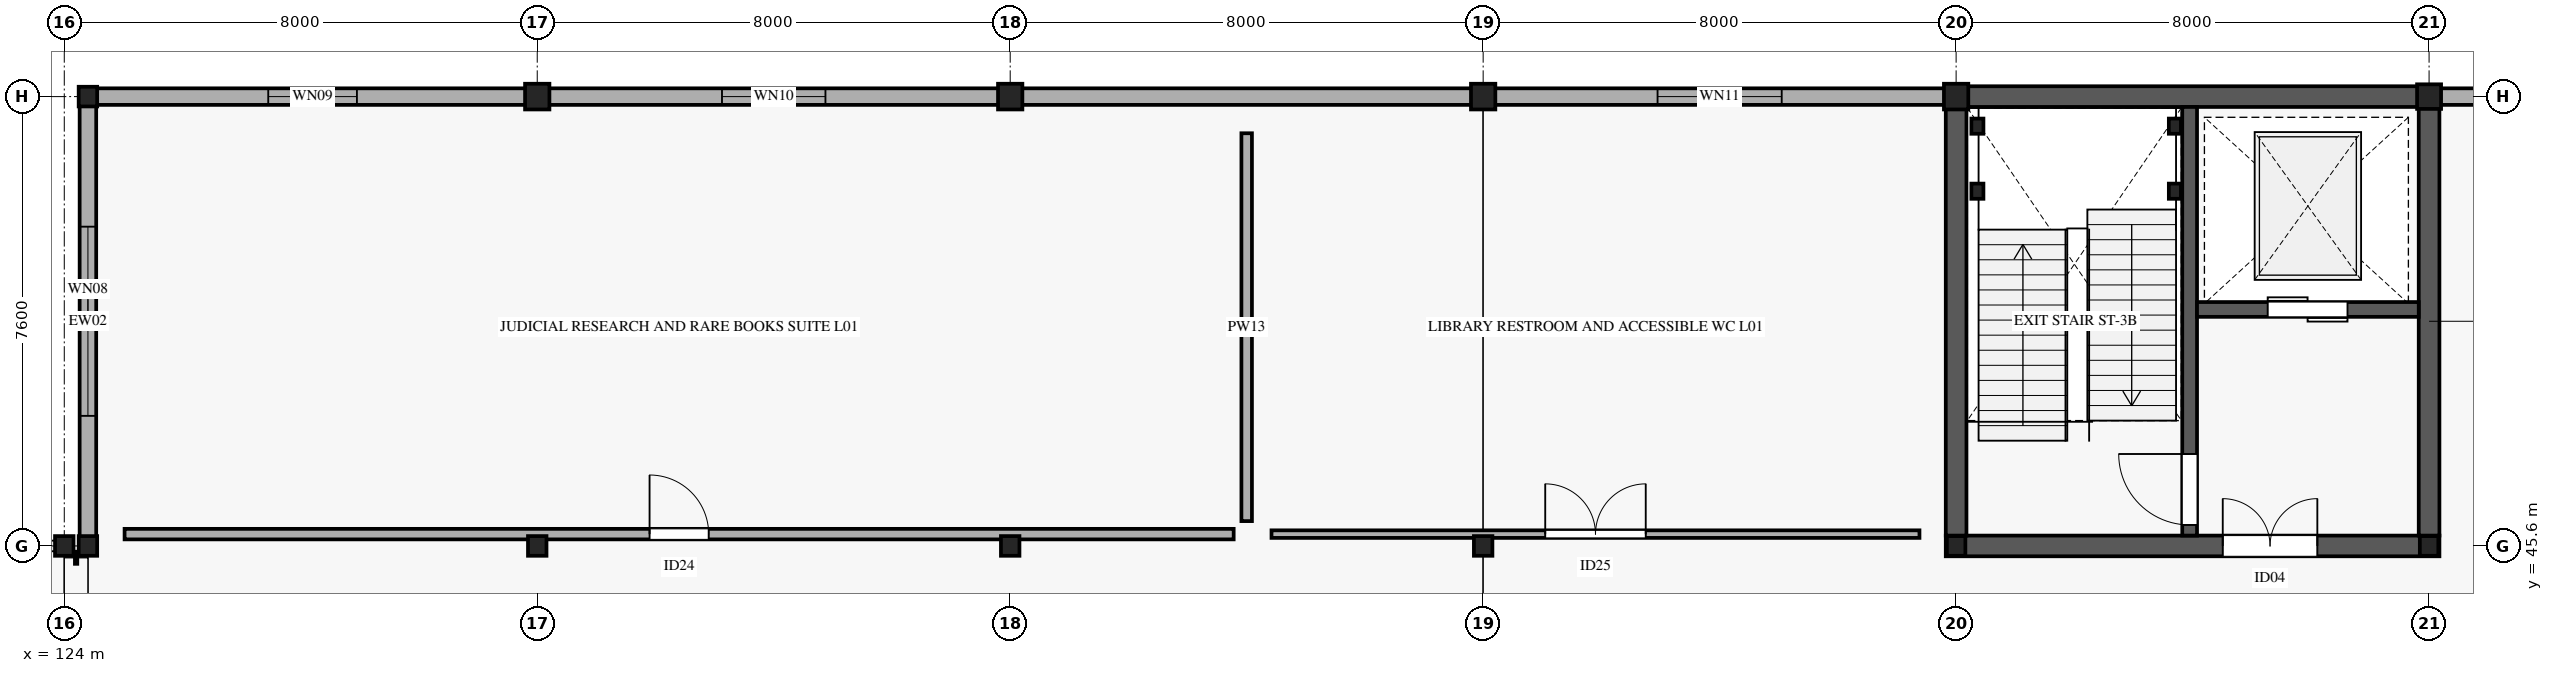
"""IFC4 building model, lengths in metres.
Left out: names, types, materials, properties, quantities, classifications, styles, units other than length and angle.
Written with IfcOpenShell. Run it as: python <this file> out.ifc"""

import sys

from ifc_helpers import new_model, si_unit, direction, frame, frame_2d, origin, origin_2d, place, context, subcontext, project, spatial, rectangle, i_section, extrude, element, fill, save


model = new_model("IFC4")
c1 = context("Model", 3, precision=1e-05, world=origin(), true_north=direction((0.0, 1.0)))
c2 = subcontext(c1, "Body", "Model", "MODEL_VIEW")
j1 = project(units=[si_unit("LENGTHUNIT", "METRE"), si_unit("PLANEANGLEUNIT", "RADIAN")], contexts=[c1])
p1 = place(None, origin())
s1 = spatial("IfcSite", under=j1, at=p1, CompositionType="ELEMENT")
p2 = place(p1, origin())
s2 = spatial("IfcBuilding", under=s1, at=p2, CompositionType="ELEMENT")
p3 = place(p2, frame((0.0, 0.0, 5.4)))
s3 = spatial("IfcBuildingStorey", under=s2, at=p3, CompositionType="ELEMENT", Elevation=5.4)
for number, where, z_axis, x_axis in (
    (1, (124.4, 45.6, 0.0), (0.0, 0.0, 1.0), (1.0, 0.0, 0.0)),
    (2, (124.4, 53.2, 0.0), (0.0, 0.0, 1.0), (1.0, 0.0, 0.0)),
    (3, (132.0, 45.6, 0.0), (0.0, 0.0, 1.0), (1.0, 0.0, 0.0)),
):
    element("IfcColumn", number, at=place(p3, frame(where, z_axis=z_axis, x_axis=x_axis)), inside=s3, PredefinedType="COLUMN", context=c2, shape_type="SweptSolid", body=[
        extrude(i_section(OverallWidth=0.313, OverallDepth=0.333, WebThickness=0.018, FlangeThickness=0.028, FilletRadius=0.015, at=origin_2d()), origin(), (0.0, 0.0, 1.0), 5.185),
    ])
p4 = place(p3, frame((132.0, 53.2, 0.0), z_axis=(0.0, 0.0, 1.0), x_axis=(1.0, 0.0, 0.0)))
e4 = element("IfcColumn", 4, at=p4, inside=s3, PredefinedType="COLUMN", context=c2, shape_type="SweptSolid", body=[
    extrude(i_section(OverallWidth=0.412, OverallDepth=0.435, WebThickness=0.036, FlangeThickness=0.057, FilletRadius=0.015, at=origin_2d()), origin(), (0.0, 0.0, 1.0), 5.185),
])
p5 = place(p3, frame((140.0, 45.6, 0.0), z_axis=(0.0, 0.0, 1.0), x_axis=(1.0, 0.0, 0.0)))
e5 = element("IfcColumn", 5, at=p5, inside=s3, PredefinedType="COLUMN", context=c2, shape_type="SweptSolid", body=[
    extrude(i_section(OverallWidth=0.313, OverallDepth=0.333, WebThickness=0.018, FlangeThickness=0.028, FilletRadius=0.015, at=origin_2d()), origin(), (0.0, 0.0, 1.0), 5.185),
])
p6 = place(p3, frame((140.0, 53.2, 0.0), z_axis=(0.0, 0.0, 1.0), x_axis=(1.0, 0.0, 0.0)))
e6 = element("IfcColumn", 6, at=p6, inside=s3, PredefinedType="COLUMN", context=c2, shape_type="SweptSolid", body=[
    extrude(i_section(OverallWidth=0.412, OverallDepth=0.435, WebThickness=0.036, FlangeThickness=0.057, FilletRadius=0.015, at=origin_2d()), origin(), (0.0, 0.0, 1.0), 5.185),
])
p7 = place(p3, frame((148.0, 45.6, 0.0), z_axis=(0.0, 0.0, 1.0), x_axis=(1.0, 0.0, 0.0)))
e7 = element("IfcColumn", 7, at=p7, inside=s3, PredefinedType="COLUMN", context=c2, shape_type="SweptSolid", body=[
    extrude(i_section(OverallWidth=0.313, OverallDepth=0.333, WebThickness=0.018, FlangeThickness=0.028, FilletRadius=0.015, at=origin_2d()), origin(), (0.0, 0.0, 1.0), 5.185),
])
p8 = place(p3, frame((148.0, 53.2, 0.0), z_axis=(0.0, 0.0, 1.0), x_axis=(1.0, 0.0, 0.0)))
e8 = element("IfcColumn", 8, at=p8, inside=s3, PredefinedType="COLUMN", context=c2, shape_type="SweptSolid", body=[
    extrude(i_section(OverallWidth=0.412, OverallDepth=0.435, WebThickness=0.036, FlangeThickness=0.057, FilletRadius=0.015, at=origin_2d()), origin(), (0.0, 0.0, 1.0), 5.185),
])
p9 = place(p3, frame((156.0, 45.6, 0.0), z_axis=(0.0, 0.0, 1.0), x_axis=(1.0, 0.0, 0.0)))
e9 = element("IfcColumn", 9, at=p9, inside=s3, PredefinedType="COLUMN", context=c2, shape_type="SweptSolid", body=[
    extrude(i_section(OverallWidth=0.313, OverallDepth=0.333, WebThickness=0.018, FlangeThickness=0.028, FilletRadius=0.015, at=origin_2d()), origin(), (0.0, 0.0, 1.0), 5.185),
])
p10 = place(p3, frame((156.0, 53.2, 0.0), z_axis=(0.0, 0.0, 1.0), x_axis=(1.0, 0.0, 0.0)))
e10 = element("IfcColumn", 10, at=p10, inside=s3, PredefinedType="COLUMN", context=c2, shape_type="SweptSolid", body=[
    extrude(i_section(OverallWidth=0.412, OverallDepth=0.435, WebThickness=0.036, FlangeThickness=0.057, FilletRadius=0.015, at=origin_2d()), origin(), (0.0, 0.0, 1.0), 5.185),
])
p11 = place(p3, frame((164.0, 45.6, 0.0), z_axis=(0.0, 0.0, 1.0), x_axis=(1.0, 0.0, 0.0)))
e11 = element("IfcColumn", 11, at=p11, inside=s3, PredefinedType="COLUMN", context=c2, shape_type="SweptSolid", body=[
    extrude(i_section(OverallWidth=0.313, OverallDepth=0.333, WebThickness=0.018, FlangeThickness=0.028, FilletRadius=0.015, at=origin_2d()), origin(), (0.0, 0.0, 1.0), 5.185),
])
p12 = place(p3, frame((164.0, 53.2, 0.0), z_axis=(0.0, 0.0, 1.0), x_axis=(1.0, 0.0, 0.0)))
e12 = element("IfcColumn", 12, at=p12, inside=s3, PredefinedType="COLUMN", context=c2, shape_type="SweptSolid", body=[
    extrude(i_section(OverallWidth=0.406, OverallDepth=0.416, WebThickness=0.03, FlangeThickness=0.048, FilletRadius=0.015, at=origin_2d()), origin(), (0.0, 0.0, 1.0), 5.185),
])
p13 = place(p3, frame((124.0, 45.6, 0.0), z_axis=(0.0, 0.0, 1.0), x_axis=(1.0, 0.0, 0.0)))
e13 = element("IfcColumn", 13, at=p13, inside=s3, PredefinedType="COLUMN", context=c2, shape_type="SweptSolid", body=[
    extrude(i_section(OverallWidth=0.313, OverallDepth=0.333, WebThickness=0.018, FlangeThickness=0.028, FilletRadius=0.015, at=origin_2d()), origin(), (0.0, 0.0, 1.0), 5.185),
])
p14 = place(p3, frame((124.4, 45.58, 0.0), z_axis=(0.0, 0.0, 1.0), x_axis=(0.0, 1.0, 0.0)))
e14 = element("IfcWall", 14, at=p14, inside=s3, PredefinedType="STANDARD", context=c2, shape_type="SweptSolid", body=[
    extrude(rectangle(XDim=7.64, YDim=0.28, at=frame_2d((3.82, 0.0))), origin(), (0.0, 0.0, 1.0), 4.25),
])
p15 = place(p14, frame((2.22, 0.0, 0.75)))
e15 = element("IfcOpeningElement", 15, at=p15, cuts=e14, PredefinedType="OPENING", context=c2, shape_type="SweptSolid", body=[
    extrude(rectangle(XDim=3.2, YDim=2.0, at=frame_2d((1.6, 1.0))), frame((0.0, 0.15, 0.0), z_axis=(0.0, -1.0, 0.0), x_axis=(1.0, 0.0, 0.0)), (0.0, 0.0, 1.0), 0.3),
])
p16 = place(p3, frame((124.38, 53.2, 0.0), z_axis=(0.0, 0.0, 1.0), x_axis=(1.0, 0.0, 0.0)))
e16 = element("IfcWall", 16, at=p16, inside=s3, PredefinedType="STANDARD", context=c2, shape_type="SweptSolid", body=[
    extrude(rectangle(XDim=7.64, YDim=0.28, at=frame_2d((3.82, 0.0))), origin(), (0.0, 0.0, 1.0), 4.25),
])
p17 = place(p16, frame((3.07, 0.0, 0.75)))
e17 = element("IfcOpeningElement", 17, at=p17, cuts=e16, PredefinedType="OPENING", context=c2, shape_type="SweptSolid", body=[
    extrude(rectangle(XDim=1.5, YDim=2.15, at=frame_2d((0.75, 1.075))), frame((0.0, 0.15, 0.0), z_axis=(0.0, -1.0, 0.0), x_axis=(1.0, 0.0, 0.0)), (0.0, 0.0, 1.0), 0.3),
])
p18 = place(p3, frame((131.98, 53.2, 0.0), z_axis=(0.0, 0.0, 1.0), x_axis=(1.0, 0.0, 0.0)))
e18 = element("IfcWall", 18, at=p18, inside=s3, PredefinedType="STANDARD", context=c2, shape_type="SweptSolid", body=[
    extrude(rectangle(XDim=8.04, YDim=0.28, at=frame_2d((4.02, 0.0))), origin(), (0.0, 0.0, 1.0), 4.25),
])
p19 = place(p18, frame((3.145, 0.0, 0.75)))
e19 = element("IfcOpeningElement", 19, at=p19, cuts=e18, PredefinedType="OPENING", context=c2, shape_type="SweptSolid", body=[
    extrude(rectangle(XDim=1.75, YDim=2.15, at=frame_2d((0.875, 1.075))), frame((0.0, 0.15, 0.0), z_axis=(0.0, -1.0, 0.0), x_axis=(1.0, 0.0, 0.0)), (0.0, 0.0, 1.0), 0.3),
])
p20 = place(p3, frame((139.98, 53.2, 0.0), z_axis=(0.0, 0.0, 1.0), x_axis=(1.0, 0.0, 0.0)))
e20 = element("IfcWall", 20, at=p20, inside=s3, PredefinedType="STANDARD", context=c2, shape_type="SweptSolid", body=[
    extrude(rectangle(XDim=8.04, YDim=0.28, at=frame_2d((4.02, 0.0))), origin(), (0.0, 0.0, 1.0), 4.25),
])
p21 = place(p3, frame((147.98, 53.2, 0.0), z_axis=(0.0, 0.0, 1.0), x_axis=(1.0, 0.0, 0.0)))
e21 = element("IfcWall", 21, at=p21, inside=s3, PredefinedType="STANDARD", context=c2, shape_type="SweptSolid", body=[
    extrude(rectangle(XDim=8.04, YDim=0.28, at=frame_2d((4.02, 0.0))), origin(), (0.0, 0.0, 1.0), 4.25),
])
p22 = place(p21, frame((2.97, 0.0, 0.75)))
e22 = element("IfcOpeningElement", 22, at=p22, cuts=e21, PredefinedType="OPENING", context=c2, shape_type="SweptSolid", body=[
    extrude(rectangle(XDim=2.1, YDim=2.15, at=frame_2d((1.05, 1.075))), frame((0.0, 0.15, 0.0), z_axis=(0.0, -1.0, 0.0), x_axis=(1.0, 0.0, 0.0)), (0.0, 0.0, 1.0), 0.3),
])
p23 = place(p3, frame((163.98, 53.2, 0.0), z_axis=(0.0, 0.0, 1.0), x_axis=(1.0, 0.0, 0.0)))
e23 = element("IfcWall", 23, at=p23, inside=s3, PredefinedType="STANDARD", context=c2, shape_type="SweptSolid", body=[
    extrude(rectangle(XDim=8.04, YDim=0.28, at=frame_2d((4.02, 0.0))), origin(), (0.0, 0.0, 1.0), 4.25),
])
p24 = place(p23, frame((2.77, 0.0, 0.75)))
e24 = element("IfcOpeningElement", 24, at=p24, cuts=e23, PredefinedType="OPENING", context=c2, shape_type="SweptSolid", body=[
    extrude(rectangle(XDim=2.5, YDim=2.15, at=frame_2d((1.25, 1.075))), frame((0.0, 0.15, 0.0), z_axis=(0.0, -1.0, 0.0), x_axis=(1.0, 0.0, 0.0)), (0.0, 0.0, 1.0), 0.3),
])
p25 = place(p3, frame((124.18, 45.4, 0.0), z_axis=(0.0, 0.0, 1.0), x_axis=(1.0, 0.0, 0.0)))
e25 = element("IfcWall", 25, at=p25, inside=s3, PredefinedType="STANDARD", context=c2, shape_type="SweptSolid", body=[
    extrude(rectangle(XDim=0.04, YDim=0.205, at=frame_2d((0.02, 0.0))), origin(), (0.0, 0.0, 1.0), 4.62),
])
p26 = place(p3, frame((155.825, 45.6, 0.0), z_axis=(0.0, 0.0, 1.0), x_axis=(1.0, 0.0, 0.0)))
e26 = element("IfcWall", 26, at=p26, inside=s3, PredefinedType="SHEAR", context=c2, shape_type="SweptSolid", body=[
    extrude(rectangle(XDim=8.35, YDim=0.35, at=frame_2d((4.175, 0.0))), origin(), (0.0, 0.0, 1.0), 5.19),
])
p27 = place(p26, frame((4.685, 0.0, 0.0)))
e27 = element("IfcOpeningElement", 27, at=p27, cuts=e26, PredefinedType="OPENING", context=c2, shape_type="SweptSolid", body=[
    extrude(rectangle(XDim=1.6, YDim=2.35, at=frame_2d((0.8, 1.175))), frame((0.0, 0.185, 0.0), z_axis=(0.0, -1.0, 0.0), x_axis=(1.0, 0.0, 0.0)), (0.0, 0.0, 1.0), 0.37),
])
p28 = place(p3, frame((155.825, 53.2, 0.0), z_axis=(0.0, 0.0, 1.0), x_axis=(1.0, 0.0, 0.0)))
e28 = element("IfcWall", 28, at=p28, inside=s3, PredefinedType="SHEAR", context=c2, shape_type="SweptSolid", body=[
    extrude(rectangle(XDim=8.35, YDim=0.35, at=frame_2d((4.175, 0.0))), origin(), (0.0, 0.0, 1.0), 5.19),
])
for number, where, z_axis, x_axis in (
    (29, (156.0, 45.775, 0.0), (0.0, 0.0, 1.0), (0.0, 1.0, 0.0)),
    (30, (164.0, 45.775, 0.0), (0.0, 0.0, 1.0), (0.0, 1.0, 0.0)),
):
    element("IfcWall", number, at=place(p3, frame(where, z_axis=z_axis, x_axis=x_axis)), inside=s3, PredefinedType="SHEAR", context=c2, shape_type="SweptSolid", body=[
        extrude(rectangle(XDim=7.25, YDim=0.35, at=frame_2d((3.625, 0.0))), origin(), (0.0, 0.0, 1.0), 5.19),
    ])
p29 = place(p3, frame((159.95, 45.775, 0.0), z_axis=(0.0, 0.0, 1.0), x_axis=(0.0, 1.0, 0.0)))
e31 = element("IfcWall", 31, at=p29, inside=s3, PredefinedType="SHEAR", context=c2, shape_type="SweptSolid", body=[
    extrude(rectangle(XDim=7.25, YDim=0.25, at=frame_2d((3.625, 0.0))), origin(), (0.0, 0.0, 1.0), 5.19),
])
p30 = place(p29, frame((0.18, 0.0, 0.0)))
e32 = element("IfcOpeningElement", 32, at=p30, cuts=e31, PredefinedType="OPENING", context=c2, shape_type="SweptSolid", body=[
    extrude(rectangle(XDim=1.2, YDim=2.2, at=frame_2d((0.6, 1.1))), frame((0.0, 0.135, 0.0), z_axis=(0.0, -1.0, 0.0), x_axis=(1.0, 0.0, 0.0)), (0.0, 0.0, 1.0), 0.27),
])
p31 = place(p3, frame((160.075, 49.6, 0.0), z_axis=(0.0, 0.0, 1.0), x_axis=(1.0, 0.0, 0.0)))
e33 = element("IfcWall", 33, at=p31, inside=s3, PredefinedType="SHEAR", context=c2, shape_type="SweptSolid", body=[
    extrude(rectangle(XDim=3.75, YDim=0.25, at=frame_2d((1.875, 0.0))), origin(), (0.0, 0.0, 1.0), 5.19),
])
p32 = place(p31, frame((1.195, 0.0, 0.0)))
e34 = element("IfcOpeningElement", 34, at=p32, cuts=e33, PredefinedType="OPENING", context=c2, shape_type="SweptSolid", body=[
    extrude(rectangle(XDim=1.35, YDim=2.2, at=frame_2d((0.675, 1.1))), frame((0.0, 0.135, 0.0), z_axis=(0.0, -1.0, 0.0), x_axis=(1.0, 0.0, 0.0)), (0.0, 0.0, 1.0), 0.27),
])
for number, where, z_axis, x_axis in (
    (35, (156.36, 51.6, 0.0), (0.0, 0.0, 1.0), (1.0, 0.0, 0.0)),
    (36, (159.7, 51.6, 0.0), (0.0, 0.0, 1.0), (1.0, 0.0, 0.0)),
    (37, (156.36, 52.7, 0.0), (0.0, 0.0, 1.0), (1.0, 0.0, 0.0)),
    (38, (159.7, 52.7, 0.0), (0.0, 0.0, 1.0), (1.0, 0.0, 0.0)),
):
    element("IfcColumn", number, at=place(p3, frame(where, z_axis=z_axis, x_axis=x_axis)), inside=s3, PredefinedType="COLUMN", context=c2, shape_type="SweptSolid", body=[
        extrude(i_section(OverallWidth=0.204, OverallDepth=0.257, WebThickness=0.009, FlangeThickness=0.016, FilletRadius=0.013, at=origin_2d()), origin(), (0.0, 0.0, 1.0), 5.395),
    ])
p33 = place(p3, frame((125.02, 45.8, 0.0), z_axis=(0.0, 0.0, 1.0), x_axis=(1.0, 0.0, 0.0)))
e39 = element("IfcWall", 39, at=p33, inside=s3, PredefinedType="PARTITIONING", context=c2, shape_type="SweptSolid", body=[
    extrude(rectangle(XDim=18.76, YDim=0.178, at=frame_2d((9.38, 0.0))), origin(), (0.0, 0.0, 1.0), 4.05),
])
p34 = place(p33, frame((8.88, 0.0, 0.0)))
e40 = element("IfcOpeningElement", 40, at=p34, cuts=e39, PredefinedType="OPENING", context=c2, shape_type="SweptSolid", body=[
    extrude(rectangle(XDim=1.0, YDim=2.15, at=frame_2d((0.5, 1.075))), frame((0.0, 0.099, 0.0), z_axis=(0.0, -1.0, 0.0), x_axis=(1.0, 0.0, 0.0)), (0.0, 0.0, 1.0), 0.198),
])
p35 = place(p3, frame((144.0, 46.02, 0.0), z_axis=(0.0, 0.0, 1.0), x_axis=(0.0, 1.0, 0.0)))
e41 = element("IfcWall", 41, at=p35, inside=s3, PredefinedType="PARTITIONING", context=c2, shape_type="SweptSolid", body=[
    extrude(rectangle(XDim=6.56, YDim=0.178, at=frame_2d((3.28, 0.0))), origin(), (0.0, 0.0, 1.0), 4.05),
])
p36 = place(p3, frame((144.42, 45.8, 0.0), z_axis=(0.0, 0.0, 1.0), x_axis=(1.0, 0.0, 0.0)))
e42 = element("IfcWall", 42, at=p36, inside=s3, PredefinedType="PARTITIONING", context=c2, shape_type="SweptSolid", body=[
    extrude(rectangle(XDim=10.96, YDim=0.128, at=frame_2d((5.48, 0.0))), origin(), (0.0, 0.0, 1.0), 4.05),
])
p37 = place(p36, frame((4.63, 0.0, 0.0)))
e43 = element("IfcOpeningElement", 43, at=p37, cuts=e42, PredefinedType="OPENING", context=c2, shape_type="SweptSolid", body=[
    extrude(rectangle(XDim=1.7, YDim=2.3, at=frame_2d((0.85, 1.15))), frame((0.0, 0.074, 0.0), z_axis=(0.0, -1.0, 0.0), x_axis=(1.0, 0.0, 0.0)), (0.0, 0.0, 1.0), 0.148),
])
p38 = place(p15, origin())
e44 = element("IfcWindow", 44, at=p38, inside=s3, PartitioningType="SINGLE_PANEL", PredefinedType="WINDOW", context=c2, shape_type="SweptSolid", body=[
    extrude(rectangle(XDim=3.2, YDim=2.0, at=frame_2d((1.6, 1.0))), frame((0.0, 0.03, 0.0), z_axis=(0.0, -1.0, 0.0), x_axis=(1.0, 0.0, 0.0)), (0.0, 0.0, 1.0), 0.06),
])
fill(e15, e44)
p39 = place(p17, origin())
e45 = element("IfcWindow", 45, at=p39, inside=s3, PartitioningType="SINGLE_PANEL", PredefinedType="WINDOW", context=c2, shape_type="SweptSolid", body=[
    extrude(rectangle(XDim=1.5, YDim=2.15, at=frame_2d((0.75, 1.075))), frame((0.0, 0.03, 0.0), z_axis=(0.0, -1.0, 0.0), x_axis=(1.0, 0.0, 0.0)), (0.0, 0.0, 1.0), 0.06),
])
fill(e17, e45)
p40 = place(p19, origin())
e46 = element("IfcWindow", 46, at=p40, inside=s3, PartitioningType="SINGLE_PANEL", PredefinedType="WINDOW", context=c2, shape_type="SweptSolid", body=[
    extrude(rectangle(XDim=1.75, YDim=2.15, at=frame_2d((0.875, 1.075))), frame((0.0, 0.03, 0.0), z_axis=(0.0, -1.0, 0.0), x_axis=(1.0, 0.0, 0.0)), (0.0, 0.0, 1.0), 0.06),
])
fill(e19, e46)
p41 = place(p22, origin())
e47 = element("IfcWindow", 47, at=p41, inside=s3, PartitioningType="SINGLE_PANEL", PredefinedType="WINDOW", context=c2, shape_type="SweptSolid", body=[
    extrude(rectangle(XDim=2.1, YDim=2.15, at=frame_2d((1.05, 1.075))), frame((0.0, 0.03, 0.0), z_axis=(0.0, -1.0, 0.0), x_axis=(1.0, 0.0, 0.0)), (0.0, 0.0, 1.0), 0.06),
])
fill(e22, e47)
p42 = place(p30, origin())
e48 = element("IfcDoor", 48, at=p42, inside=s3, OperationType="SINGLE_SWING_RIGHT", PredefinedType="DOOR", context=c2, shape_type="SweptSolid", body=[
    extrude(rectangle(XDim=1.2, YDim=2.2, at=frame_2d((0.6, 1.1))), frame((0.0, 0.025, 0.0), z_axis=(0.0, -1.0, 0.0), x_axis=(1.0, 0.0, 0.0)), (0.0, 0.0, 1.0), 0.05),
])
fill(e32, e48)
p43 = place(p27, origin())
e49 = element("IfcDoor", 49, at=p43, inside=s3, OperationType="DOUBLE_DOOR_SINGLE_SWING", PredefinedType="DOOR", context=c2, shape_type="SweptSolid", body=[
    extrude(rectangle(XDim=1.6, YDim=2.35, at=frame_2d((0.8, 1.175))), frame((0.0, 0.025, 0.0), z_axis=(0.0, -1.0, 0.0), x_axis=(1.0, 0.0, 0.0)), (0.0, 0.0, 1.0), 0.05),
])
fill(e27, e49)
p44 = place(p32, origin())
e50 = element("IfcDoor", 50, at=p44, inside=s3, OperationType="DOUBLE_DOOR_SLIDING", PredefinedType="DOOR", context=c2, shape_type="SweptSolid", body=[
    extrude(rectangle(XDim=1.35, YDim=2.2, at=frame_2d((0.675, 1.1))), frame((0.0, 0.025, 0.0), z_axis=(0.0, -1.0, 0.0), x_axis=(1.0, 0.0, 0.0)), (0.0, 0.0, 1.0), 0.05),
])
fill(e34, e50)
p45 = place(p34, origin())
e51 = element("IfcDoor", 51, at=p45, inside=s3, OperationType="SINGLE_SWING_LEFT", PredefinedType="DOOR", context=c2, shape_type="SweptSolid", body=[
    extrude(rectangle(XDim=1.0, YDim=2.15, at=frame_2d((0.5, 1.075))), frame((0.0, 0.025, 0.0), z_axis=(0.0, -1.0, 0.0), x_axis=(1.0, 0.0, 0.0)), (0.0, 0.0, 1.0), 0.05),
])
fill(e40, e51)
p46 = place(p37, origin())
e52 = element("IfcDoor", 52, at=p46, inside=s3, OperationType="DOUBLE_DOOR_SINGLE_SWING", PredefinedType="DOOR", context=c2, shape_type="SweptSolid", body=[
    extrude(rectangle(XDim=1.7, YDim=2.3, at=frame_2d((0.85, 1.15))), frame((0.0, 0.025, 0.0), z_axis=(0.0, -1.0, 0.0), x_axis=(1.0, 0.0, 0.0)), (0.0, 0.0, 1.0), 0.05),
])
fill(e43, e52)
save(model, sys.argv[1])
